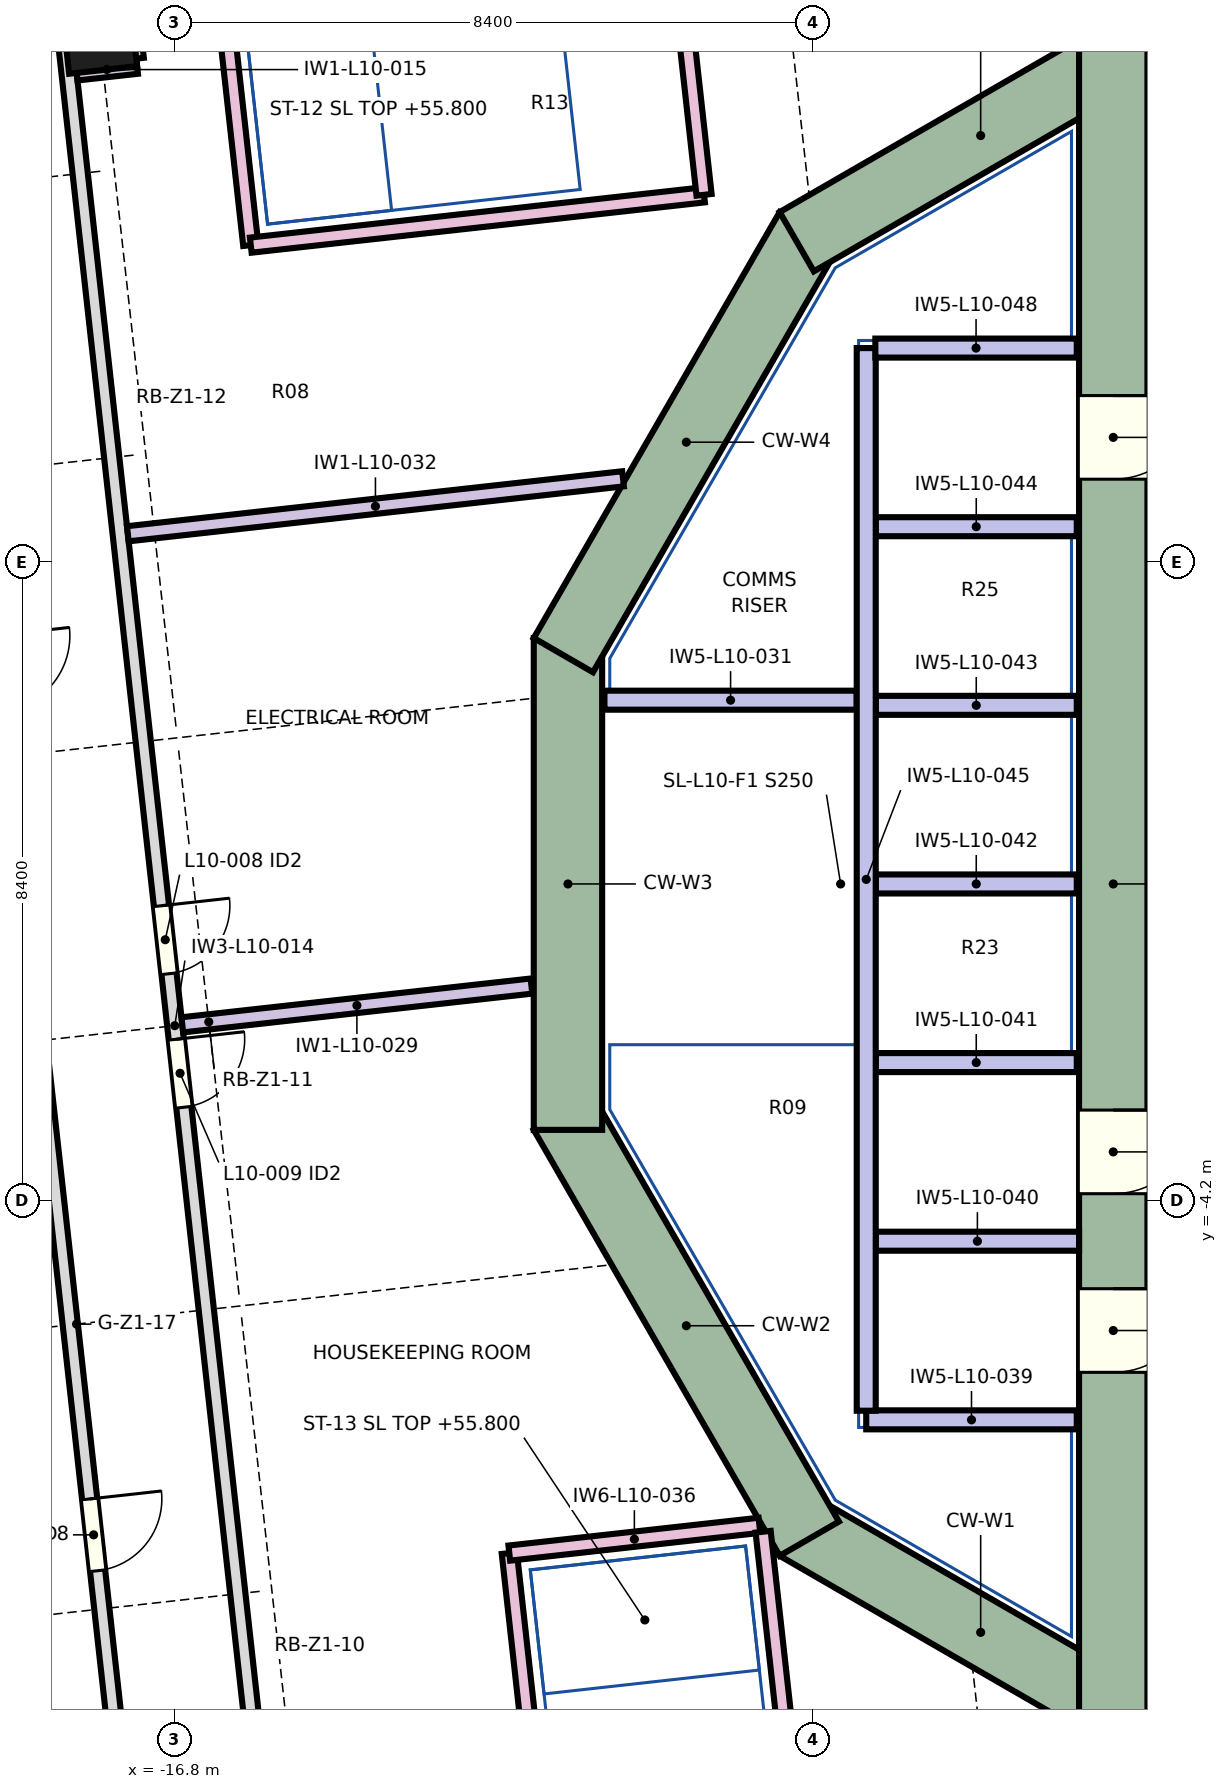
"""IFC4 building model, lengths in metres.
Left out: names, types, materials, properties, quantities, classifications, styles, units other than length and angle.
Written with IfcOpenShell. Run it as: python <this file> out.ifc"""

import sys

from ifc_helpers import new_model, si_unit, direction, frame, frame_2d, origin, origin_2d, place, context, subcontext, project, spatial, rectangle, extrude, element, fill, save


model = new_model("IFC4")
c1 = context("Model", 3, precision=1e-05, world=origin(), true_north=direction((0.0, 1.0)))
c2 = subcontext(c1, "Body", "Model", "MODEL_VIEW")
j1 = project(units=[si_unit("LENGTHUNIT", "METRE"), si_unit("PLANEANGLEUNIT", "RADIAN")], contexts=[c1])
p1 = place(None, origin())
s1 = spatial("IfcSite", under=j1, at=p1, CompositionType="ELEMENT")
p2 = place(p1, origin())
s2 = spatial("IfcBuilding", under=s1, at=p2, CompositionType="ELEMENT")
p3 = place(p2, frame((0.0, 0.0, 53.9)))
s3 = spatial("IfcBuildingStorey", under=s2, at=p3, CompositionType="ELEMENT", Elevation=53.9)
p4 = place(p3, frame((-17.789, 11.156, 0.0), z_axis=(0.0, 0.0, 1.0), x_axis=(0.993896946415, 0.110312555526, 0.0)))
e1 = element("IfcColumn", 1, at=p4, inside=s3, PredefinedType="COLUMN", context=c2, shape_type="SweptSolid", body=[
    extrude(rectangle(XDim=0.9, YDim=0.9, at=origin_2d()), origin(), (0.0, 0.0, 1.0), 3.55),
])
p5 = place(p3, frame((-3.775, -11.243, 0.0), z_axis=(0.0, 0.0, 1.0), x_axis=(-0.866026961591, 0.49999730179, 0.0)))
e2 = element("IfcWall", 2, at=p5, inside=s3, PredefinedType="SHEAR", context=c2, shape_type="SweptSolid", body=[
    extrude(rectangle(XDim=5.587, YDim=0.9, at=frame_2d((2.794, 0.0))), origin(), (0.0, 0.0, 1.0), 3.8),
])
p6 = place(p3, frame((-8.449, -8.614, 0.0), z_axis=(0.0, 0.0, 1.0), x_axis=(-0.499990282633, 0.866031014036, 0.0)))
e3 = element("IfcWall", 3, at=p6, inside=s3, PredefinedType="SHEAR", context=c2, shape_type="SweptSolid", body=[
    extrude(rectangle(XDim=6.47, YDim=0.9, at=frame_2d((3.235, 0.0))), origin(), (0.0, 0.0, 1.0), 3.8),
])
p7 = place(p3, frame((-11.624, -3.235, 0.0), z_axis=(0.0, 0.0, 1.0), x_axis=(0.0, 1.0, 0.0)))
e4 = element("IfcWall", 4, at=p7, inside=s3, PredefinedType="SHEAR", context=c2, shape_type="SweptSolid", body=[
    extrude(rectangle(XDim=6.471, YDim=0.9, at=frame_2d((3.235, 0.0))), origin(), (0.0, 0.0, 1.0), 3.8),
])
p8 = place(p3, frame((-11.684, 3.01, 0.0), z_axis=(0.0, 0.0, 1.0), x_axis=(0.499990282633, 0.866031014036, 0.0)))
e5 = element("IfcWall", 5, at=p8, inside=s3, PredefinedType="SHEAR", context=c2, shape_type="SweptSolid", body=[
    extrude(rectangle(XDim=6.47, YDim=0.9, at=frame_2d((3.235, 0.0))), origin(), (0.0, 0.0, 1.0), 3.8),
])
p9 = place(p3, frame((-8.614, 8.449, 0.0), z_axis=(0.0, 0.0, 1.0), x_axis=(0.866026961591, 0.49999730179, 0.0)))
e6 = element("IfcWall", 6, at=p9, inside=s3, PredefinedType="SHEAR", context=c2, shape_type="SweptSolid", body=[
    extrude(rectangle(XDim=5.587, YDim=0.9, at=frame_2d((2.794, 0.0))), origin(), (0.0, 0.0, 1.0), 3.8),
])
p10 = place(p3, frame((-4.45, 11.633, 0.0), z_axis=(0.0, 0.0, 1.0), x_axis=(0.0, -1.0, 0.0)))
e7 = element("IfcWall", 7, at=p10, inside=s3, PredefinedType="SHEAR", context=c2, shape_type="SweptSolid", body=[
    extrude(rectangle(XDim=23.265, YDim=0.9, at=frame_2d((11.633, 0.0))), origin(), (0.0, 0.0, 1.0), 3.8),
])
p11 = place(p10, frame((14.607, 0.0, 0.0)))
e8 = element("IfcOpeningElement", 8, at=p11, cuts=e7, PredefinedType="OPENING", context=c2, shape_type="SweptSolid", body=[
    extrude(rectangle(XDim=1.1, YDim=2.1, at=frame_2d((0.55, 1.05))), frame((0.0, 0.46, 0.0), z_axis=(0.0, -1.0, 0.0), x_axis=(1.0, 0.0, 0.0)), (0.0, 0.0, 1.0), 0.92),
])
p12 = place(p10, frame((16.958, 0.0, 0.0)))
e9 = element("IfcOpeningElement", 9, at=p12, cuts=e7, PredefinedType="OPENING", context=c2, shape_type="SweptSolid", body=[
    extrude(rectangle(XDim=1.1, YDim=2.1, at=frame_2d((0.55, 1.05))), frame((0.0, 0.46, 0.0), z_axis=(0.0, -1.0, 0.0), x_axis=(1.0, 0.0, 0.0)), (0.0, 0.0, 1.0), 0.92),
])
p13 = place(p10, frame((5.208, 0.0, 0.0)))
e10 = element("IfcOpeningElement", 10, at=p13, cuts=e7, PredefinedType="OPENING", context=c2, shape_type="SweptSolid", body=[
    extrude(rectangle(XDim=1.1, YDim=2.1, at=frame_2d((0.55, 1.05))), frame((0.0, 0.46, 0.0), z_axis=(0.0, -1.0, 0.0), x_axis=(1.0, 0.0, 0.0)), (0.0, 0.0, 1.0), 0.92),
])
p14 = place(p3, frame((-20.263, 13.044, 0.0), z_axis=(0.0, 0.0, 1.0), x_axis=(0.110311163664, -0.993897100897, 0.0)))
e11 = element("IfcWall", 11, at=p14, inside=s3, PredefinedType="PARTITIONING", context=c2, shape_type="SweptSolid", body=[
    extrude(rectangle(XDim=30.5, YDim=0.2, at=frame_2d((15.25, 0.0))), origin(), (0.0, 0.0, 1.0), 3.55),
])
p15 = place(p14, frame((4.39, 0.0, 0.0)))
e12 = element("IfcOpeningElement", 12, at=p15, cuts=e11, PredefinedType="OPENING", context=c2, shape_type="SweptSolid", body=[
    extrude(rectangle(XDim=1.0, YDim=2.1, at=frame_2d((0.5, 1.05))), frame((0.0, 0.11, 0.0), z_axis=(0.0, -1.0, 0.0), x_axis=(1.0, 0.0, 0.0)), (0.0, 0.0, 1.0), 0.22),
])
p16 = place(p14, frame((9.84, 0.0, 0.0)))
e13 = element("IfcOpeningElement", 13, at=p16, cuts=e11, PredefinedType="OPENING", context=c2, shape_type="SweptSolid", body=[
    extrude(rectangle(XDim=1.0, YDim=2.1, at=frame_2d((0.5, 1.05))), frame((0.0, 0.11, 0.0), z_axis=(0.0, -1.0, 0.0), x_axis=(1.0, 0.0, 0.0)), (0.0, 0.0, 1.0), 0.22),
])
p17 = place(p14, frame((21.265, 0.0, 0.0)))
e14 = element("IfcOpeningElement", 14, at=p17, cuts=e11, PredefinedType="OPENING", context=c2, shape_type="SweptSolid", body=[
    extrude(rectangle(XDim=0.95, YDim=2.1, at=frame_2d((0.475, 1.05))), frame((0.0, 0.11, 0.0), z_axis=(0.0, -1.0, 0.0), x_axis=(1.0, 0.0, 0.0)), (0.0, 0.0, 1.0), 0.22),
])
p18 = place(p14, frame((29.09, 0.0, 0.0)))
e15 = element("IfcOpeningElement", 15, at=p18, cuts=e11, PredefinedType="OPENING", context=c2, shape_type="SweptSolid", body=[
    extrude(rectangle(XDim=1.0, YDim=2.1, at=frame_2d((0.5, 1.05))), frame((0.0, 0.11, 0.0), z_axis=(0.0, -1.0, 0.0), x_axis=(1.0, 0.0, 0.0)), (0.0, 0.0, 1.0), 0.22),
])
p19 = place(p3, frame((-18.286, 11.553, 0.0), z_axis=(0.0, 0.0, 1.0), x_axis=(0.110315409641, -0.993896629633, 0.0)))
e16 = element("IfcWall", 16, at=p19, inside=s3, PredefinedType="PARTITIONING", context=c2, shape_type="SweptSolid", body=[
    extrude(rectangle(XDim=27.0, YDim=0.2, at=frame_2d((13.5, 0.0))), origin(), (0.0, 0.0, 1.0), 3.55),
])
p20 = place(p19, frame((11.913, 0.0, 0.0)))
e17 = element("IfcOpeningElement", 17, at=p20, cuts=e16, PredefinedType="OPENING", context=c2, shape_type="SweptSolid", body=[
    extrude(rectangle(XDim=0.9, YDim=2.1, at=frame_2d((0.45, 1.05))), frame((0.0, 0.11, 0.0), z_axis=(0.0, -1.0, 0.0), x_axis=(1.0, 0.0, 0.0)), (0.0, 0.0, 1.0), 0.22),
])
p21 = place(p19, frame((13.68, 0.0, 0.0)))
e18 = element("IfcOpeningElement", 18, at=p21, cuts=e16, PredefinedType="OPENING", context=c2, shape_type="SweptSolid", body=[
    extrude(rectangle(XDim=0.9, YDim=2.1, at=frame_2d((0.45, 1.05))), frame((0.0, 0.11, 0.0), z_axis=(0.0, -1.0, 0.0), x_axis=(1.0, 0.0, 0.0)), (0.0, 0.0, 1.0), 0.22),
])
p22 = place(p3, frame((-18.087, 10.67, 0.0), z_axis=(0.0, 0.0, 1.0), x_axis=(0.993913470482, 0.110163574714, 0.0)))
e19 = element("IfcWall", 19, at=p22, inside=s3, PredefinedType="PARTITIONING", context=c2, shape_type="SweptSolid", body=[
    extrude(rectangle(XDim=0.8, YDim=0.2, at=frame_2d((0.4, 0.0))), origin(), (0.0, 0.0, 1.0), 3.55),
])
p23 = place(p3, frame((-17.303, 10.857, 0.0), z_axis=(0.0, 0.0, 1.0), x_axis=(-0.110546349969, 0.993870969748, 0.0)))
e20 = element("IfcWall", 20, at=p23, inside=s3, PredefinedType="PARTITIONING", context=c2, shape_type="SweptSolid", body=[
    extrude(rectangle(XDim=0.7, YDim=0.2, at=frame_2d((0.35, 0.0))), origin(), (0.0, 0.0, 1.0), 3.55),
])
p24 = place(p3, frame((-16.173, 11.788, 0.0), z_axis=(0.0, 0.0, 1.0), x_axis=(0.110368557057, -0.993890729212, 0.0)))
e21 = element("IfcWall", 21, at=p24, inside=s3, PredefinedType="SOLIDWALL", context=c2, shape_type="SweptSolid", body=[
    extrude(rectangle(XDim=3.404, YDim=0.2, at=frame_2d((1.702, 0.0))), origin(), (0.0, 0.0, 1.0), 3.55),
])
p25 = place(p3, frame((-15.797, 8.404, 0.0), z_axis=(0.0, 0.0, 1.0), x_axis=(0.993897125329, 0.110310943534, 0.0)))
e22 = element("IfcWall", 22, at=p25, inside=s3, PredefinedType="SOLIDWALL", context=c2, shape_type="SweptSolid", body=[
    extrude(rectangle(XDim=6.0, YDim=0.2, at=frame_2d((3.0, 0.0))), origin(), (0.0, 0.0, 1.0), 3.55),
])
p26 = place(p3, frame((-12.396, -8.803, 0.0), z_axis=(0.0, 0.0, 1.0), x_axis=(0.110335171461, -0.993894436014, 0.0)))
e23 = element("IfcWall", 23, at=p26, inside=s3, PredefinedType="SOLIDWALL", context=c2, shape_type="SweptSolid", body=[
    extrude(rectangle(XDim=6.118, YDim=0.2, at=frame_2d((3.059, 0.0))), origin(), (0.0, 0.0, 1.0), 3.55),
])
p27 = place(p3, frame((-12.104, -1.344, 0.0), z_axis=(0.0, 0.0, 1.0), x_axis=(-0.993898542439, -0.11029817468, 0.0)))
e24 = element("IfcWall", 24, at=p27, inside=s3, PredefinedType="PARTITIONING", context=c2, shape_type="SweptSolid", body=[
    extrude(rectangle(XDim=4.622, YDim=0.2, at=frame_2d((2.311, 0.0))), origin(), (0.0, 0.0, 1.0), 3.55),
])
p28 = place(p3, frame((-11.144, 2.418, 0.0), z_axis=(0.0, 0.0, 1.0), x_axis=(1.0, 0.0, 0.0)))
e25 = element("IfcWall", 25, at=p28, inside=s3, PredefinedType="SOLIDWALL", context=c2, shape_type="SweptSolid", body=[
    extrude(rectangle(XDim=3.319, YDim=0.25, at=frame_2d((1.66, 0.0))), origin(), (0.0, 0.0, 1.0), 3.55),
])
p29 = place(p3, frame((-10.899, 5.33, 0.0), z_axis=(0.0, 0.0, 1.0), x_axis=(-0.993900981435, -0.110276194628, 0.0)))
e26 = element("IfcWall", 26, at=p29, inside=s3, PredefinedType="PARTITIONING", context=c2, shape_type="SweptSolid", body=[
    extrude(rectangle(XDim=6.555, YDim=0.2, at=frame_2d((3.278, 0.0))), origin(), (0.0, 0.0, 1.0), 3.55),
])
p30 = place(p3, frame((-9.833, 9.066, 0.0), z_axis=(0.0, 0.0, 1.0), x_axis=(-0.110297715324, 0.993898593416, 0.0)))
e27 = element("IfcWall", 27, at=p30, inside=s3, PredefinedType="SOLIDWALL", context=c2, shape_type="SweptSolid", body=[
    extrude(rectangle(XDim=3.404, YDim=0.2, at=frame_2d((1.702, 0.0))), origin(), (0.0, 0.0, 1.0), 3.55),
])
p31 = place(p3, frame((-9.105, -8.438, 0.0), z_axis=(0.0, 0.0, 1.0), x_axis=(-0.993897215684, -0.110310129436, 0.0)))
e28 = element("IfcWall", 28, at=p31, inside=s3, PredefinedType="SOLIDWALL", context=c2, shape_type="SweptSolid", body=[
    extrude(rectangle(XDim=3.311, YDim=0.2, at=frame_2d((1.656, 0.0))), origin(), (0.0, 0.0, 1.0), 3.55),
])
p32 = place(p3, frame((-8.391, -14.514, 0.0), z_axis=(0.0, 0.0, 1.0), x_axis=(-0.11031151838, 0.993897061527, 0.0)))
e29 = element("IfcWall", 29, at=p32, inside=s3, PredefinedType="SOLIDWALL", context=c2, shape_type="SweptSolid", body=[
    extrude(rectangle(XDim=6.029, YDim=0.2, at=frame_2d((3.014, 0.0))), origin(), (0.0, 0.0, 1.0), 3.55),
])
p33 = place(p3, frame((-7.7, -7.05, 0.0), z_axis=(0.0, 0.0, 1.0), x_axis=(1.0, 0.0, 0.0)))
e30 = element("IfcWall", 30, at=p33, inside=s3, PredefinedType="SOLIDWALL", context=c2, shape_type="SweptSolid", body=[
    extrude(rectangle(XDim=2.77, YDim=0.25, at=frame_2d((1.385, 0.0))), origin(), (0.0, 0.0, 1.0), 3.55),
])
p34 = place(p3, frame((-7.575, -4.7, 0.0), z_axis=(0.0, 0.0, 1.0), x_axis=(1.0, 0.0, 0.0)))
e31 = element("IfcWall", 31, at=p34, inside=s3, PredefinedType="SOLIDWALL", context=c2, shape_type="SweptSolid", body=[
    extrude(rectangle(XDim=2.675, YDim=0.25, at=frame_2d((1.337, 0.0))), origin(), (0.0, 0.0, 1.0), 3.55),
])
for number, where, z_axis, x_axis in (
    (32, (-7.575, -2.35, 0.0), (0.0, 0.0, 1.0), (1.0, 0.0, 0.0)),
    (33, (-7.575, 0.0, 0.0), (0.0, 0.0, 1.0), (1.0, 0.0, 0.0)),
    (34, (-7.575, 2.35, 0.0), (0.0, 0.0, 1.0), (1.0, 0.0, 0.0)),
    (35, (-7.575, 4.7, 0.0), (0.0, 0.0, 1.0), (1.0, 0.0, 0.0)),
):
    element("IfcWall", number, at=place(p3, frame(where, z_axis=z_axis, x_axis=x_axis)), inside=s3, PredefinedType="SOLIDWALL", context=c2, shape_type="SweptSolid", body=[
        extrude(rectangle(XDim=2.645, YDim=0.25, at=frame_2d((1.323, 0.0))), origin(), (0.0, 0.0, 1.0), 3.55),
    ])
p35 = place(p3, frame((-7.7, 7.05, 0.0), z_axis=(0.0, 0.0, 1.0), x_axis=(0.0, -1.0, 0.0)))
e36 = element("IfcWall", 36, at=p35, inside=s3, PredefinedType="SOLIDWALL", context=c2, shape_type="SweptSolid", body=[
    extrude(rectangle(XDim=13.98, YDim=0.25, at=frame_2d((6.99, 0.0))), origin(), (0.0, 0.0, 1.0), 3.55),
])
p36 = place(p3, frame((-4.93, 7.05, 0.0), z_axis=(0.0, 0.0, 1.0), x_axis=(-1.0, 0.0, 0.0)))
e37 = element("IfcWall", 37, at=p36, inside=s3, PredefinedType="SOLIDWALL", context=c2, shape_type="SweptSolid", body=[
    extrude(rectangle(XDim=2.65, YDim=0.25, at=frame_2d((1.325, 0.0))), origin(), (0.0, 0.0, 1.0), 3.55),
])
p37 = place(p20, origin())
e38 = element("IfcDoor", 38, at=p37, inside=s3, OperationType="NOTDEFINED", PredefinedType="DOOR", context=c2, shape_type="SweptSolid", body=[
    extrude(rectangle(XDim=0.9, YDim=2.1, at=frame_2d((0.45, 1.05))), frame((0.0, 0.025, 0.0), z_axis=(0.0, -1.0, 0.0), x_axis=(1.0, 0.0, 0.0)), (0.0, 0.0, 1.0), 0.05),
])
fill(e17, e38)
p38 = place(p21, origin())
e39 = element("IfcDoor", 39, at=p38, inside=s3, OperationType="NOTDEFINED", PredefinedType="DOOR", context=c2, shape_type="SweptSolid", body=[
    extrude(rectangle(XDim=0.9, YDim=2.1, at=frame_2d((0.45, 1.05))), frame((0.0, 0.025, 0.0), z_axis=(0.0, -1.0, 0.0), x_axis=(1.0, 0.0, 0.0)), (0.0, 0.0, 1.0), 0.05),
])
fill(e18, e39)
p39 = place(p17, origin())
e40 = element("IfcDoor", 40, at=p39, inside=s3, OperationType="NOTDEFINED", PredefinedType="DOOR", context=c2, shape_type="SweptSolid", body=[
    extrude(rectangle(XDim=0.95, YDim=2.1, at=frame_2d((0.475, 1.05))), frame((0.0, 0.025, 0.0), z_axis=(0.0, -1.0, 0.0), x_axis=(1.0, 0.0, 0.0)), (0.0, 0.0, 1.0), 0.05),
])
fill(e14, e40)
p40 = place(p11, origin())
e41 = element("IfcDoor", 41, at=p40, inside=s3, OperationType="SLIDING_TO_LEFT", PredefinedType="DOOR", context=c2, shape_type="SweptSolid", body=[
    extrude(rectangle(XDim=1.1, YDim=2.1, at=frame_2d((0.55, 1.05))), frame((0.0, 0.025, 0.0), z_axis=(0.0, -1.0, 0.0), x_axis=(1.0, 0.0, 0.0)), (0.0, 0.0, 1.0), 0.05),
])
fill(e8, e41)
p41 = place(p12, origin())
e42 = element("IfcDoor", 42, at=p41, inside=s3, OperationType="SLIDING_TO_LEFT", PredefinedType="DOOR", context=c2, shape_type="SweptSolid", body=[
    extrude(rectangle(XDim=1.1, YDim=2.1, at=frame_2d((0.55, 1.05))), frame((0.0, 0.025, 0.0), z_axis=(0.0, -1.0, 0.0), x_axis=(1.0, 0.0, 0.0)), (0.0, 0.0, 1.0), 0.05),
])
fill(e9, e42)
p42 = place(p13, origin())
e43 = element("IfcDoor", 43, at=p42, inside=s3, OperationType="SLIDING_TO_LEFT", PredefinedType="DOOR", context=c2, shape_type="SweptSolid", body=[
    extrude(rectangle(XDim=1.1, YDim=2.1, at=frame_2d((0.55, 1.05))), frame((0.0, 0.025, 0.0), z_axis=(0.0, -1.0, 0.0), x_axis=(1.0, 0.0, 0.0)), (0.0, 0.0, 1.0), 0.05),
])
fill(e10, e43)
save(model, sys.argv[1])
